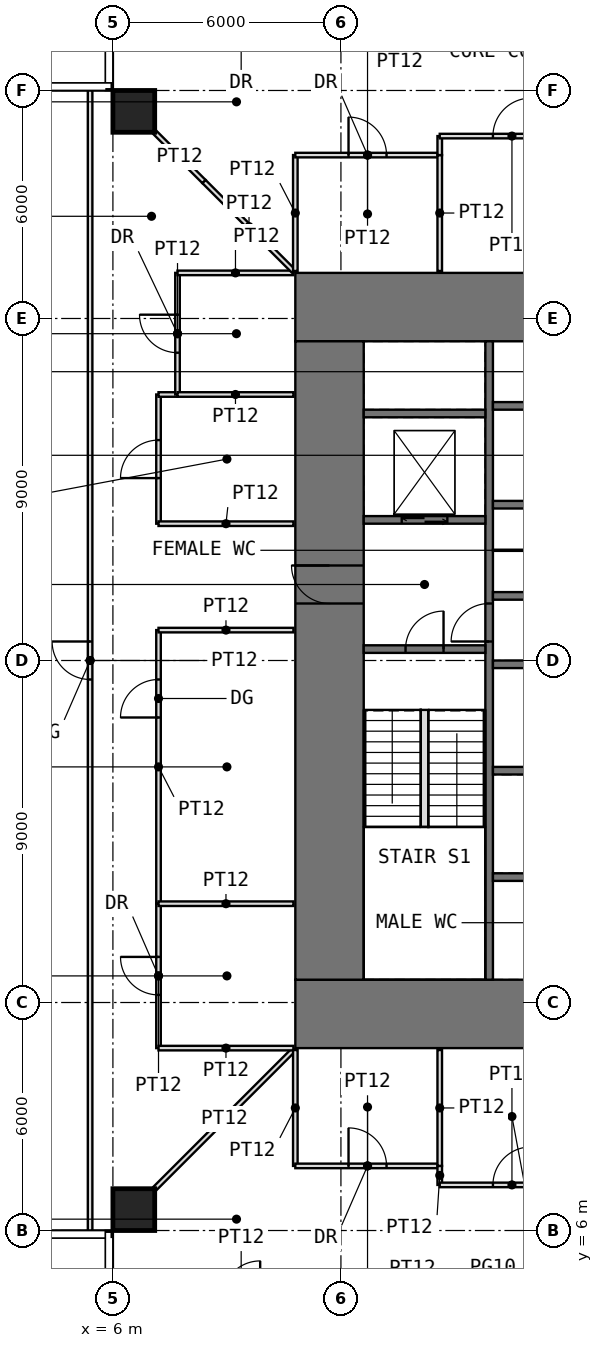
"""IFC4 building model, lengths in metres.
Left out: names, types, materials, properties, quantities, classifications, styles, units other than length and angle.
Written with IfcOpenShell. Run it as: python <this file> out.ifc"""

import sys

from ifc_helpers import new_model, si_unit, direction, frame, frame_2d, origin, origin_2d, place, context, subcontext, project, spatial, rectangle, extrude, element, fill, save


model = new_model("IFC4")
c1 = context("Model", 3, precision=1e-05, world=origin(), true_north=direction((0.0, 1.0)))
c2 = subcontext(c1, "Body", "Model", "MODEL_VIEW")
j1 = project(units=[si_unit("LENGTHUNIT", "METRE"), si_unit("PLANEANGLEUNIT", "RADIAN")], contexts=[c1])
p1 = place(None, origin())
s1 = spatial("IfcSite", under=j1, at=p1, CompositionType="ELEMENT")
p2 = place(p1, origin())
s2 = spatial("IfcBuilding", under=s1, at=p2, CompositionType="ELEMENT")
p3 = place(p2, frame((0.0, 0.0, 22.5)))
s3 = spatial("IfcBuildingStorey", under=s2, at=p3, CompositionType="ELEMENT", Elevation=22.5)
for number, where, z_axis, x_axis in (
    (1, (6.55, 6.55, 0.0), (0.0, 0.0, 1.0), (1.0, 0.0, 0.0)),
    (2, (6.55, 35.45, 0.0), (0.0, 0.0, 1.0), (1.0, 0.0, 0.0)),
):
    element("IfcColumn", number, at=place(p3, frame(where, z_axis=z_axis, x_axis=x_axis)), inside=s3, PredefinedType="COLUMN", context=c2, shape_type="SweptSolid", body=[
        extrude(rectangle(XDim=1.1, YDim=1.1, at=origin_2d()), origin(), (0.0, 0.0, 1.0), 4.0),
    ])
p4 = place(p3, frame((10.8, 11.7, -0.05), z_axis=(0.0, 0.0, 1.0), x_axis=(1.0, 0.0, 0.0)))
e3 = element("IfcWall", 3, at=p4, inside=s3, PredefinedType="SHEAR", context=c2, shape_type="SweptSolid", body=[
    extrude(rectangle(XDim=20.4, YDim=1.8, at=frame_2d((10.2, 0.0))), origin(), (0.0, 0.0, 1.0), 4.0),
])
p5 = place(p4, frame((9.2, 0.0, 0.05)))
e4 = element("IfcOpeningElement", 4, at=p5, cuts=e3, PredefinedType="OPENING", context=c2, shape_type="SweptSolid", body=[
    extrude(rectangle(XDim=2.0, YDim=2.2, at=frame_2d((1.0, 1.1))), frame((0.0, 0.91, 0.0), z_axis=(0.0, -1.0, 0.0), x_axis=(1.0, 0.0, 0.0)), (0.0, 0.0, 1.0), 1.82),
])
p6 = place(p3, frame((10.8, 30.3, -0.05), z_axis=(0.0, 0.0, 1.0), x_axis=(1.0, 0.0, 0.0)))
e5 = element("IfcWall", 5, at=p6, inside=s3, PredefinedType="SHEAR", context=c2, shape_type="SweptSolid", body=[
    extrude(rectangle(XDim=20.4, YDim=1.8, at=frame_2d((10.2, 0.0))), origin(), (0.0, 0.0, 1.0), 4.0),
])
p7 = place(p6, frame((9.2, 0.0, 0.05)))
e6 = element("IfcOpeningElement", 6, at=p7, cuts=e5, PredefinedType="OPENING", context=c2, shape_type="SweptSolid", body=[
    extrude(rectangle(XDim=2.0, YDim=2.2, at=frame_2d((1.0, 1.1))), frame((0.0, 0.91, 0.0), z_axis=(0.0, -1.0, 0.0), x_axis=(1.0, 0.0, 0.0)), (0.0, 0.0, 1.0), 1.82),
])
p8 = place(p3, frame((11.7, 12.6, -0.05), z_axis=(0.0, 0.0, 1.0), x_axis=(0.0, 1.0, 0.0)))
e7 = element("IfcWall", 7, at=p8, inside=s3, PredefinedType="SHEAR", context=c2, shape_type="SweptSolid", body=[
    extrude(rectangle(XDim=16.8, YDim=1.8, at=frame_2d((8.4, 0.0))), origin(), (0.0, 0.0, 1.0), 4.0),
])
p9 = place(p8, frame((9.9, 0.0, 0.05)))
e8 = element("IfcOpeningElement", 8, at=p9, cuts=e7, PredefinedType="OPENING", context=c2, shape_type="SweptSolid", body=[
    extrude(rectangle(XDim=1.0, YDim=2.2, at=frame_2d((0.5, 1.1))), frame((0.0, 0.91, 0.0), z_axis=(0.0, -1.0, 0.0), x_axis=(1.0, 0.0, 0.0)), (0.0, 0.0, 1.0), 1.82),
])
p10 = place(p3, frame((15.9, 12.6, -0.05), z_axis=(0.0, 0.0, 1.0), x_axis=(0.0, 1.0, 0.0)))
e9 = element("IfcWall", 9, at=p10, inside=s3, PredefinedType="SHEAR", context=c2, shape_type="SweptSolid", body=[
    extrude(rectangle(XDim=16.8, YDim=0.2, at=frame_2d((8.4, 0.0))), origin(), (0.0, 0.0, 1.0), 4.0),
])
p11 = place(p10, frame((8.9, 0.0, 0.05)))
e10 = element("IfcOpeningElement", 10, at=p11, cuts=e9, PredefinedType="OPENING", context=c2, shape_type="SweptSolid", body=[
    extrude(rectangle(XDim=1.0, YDim=2.2, at=frame_2d((0.5, 1.1))), frame((0.0, 0.11, 0.0), z_axis=(0.0, -1.0, 0.0), x_axis=(1.0, 0.0, 0.0)), (0.0, 0.0, 1.0), 0.22),
])
p12 = place(p3, frame((12.6, 21.3, -0.05), z_axis=(0.0, 0.0, 1.0), x_axis=(1.0, 0.0, 0.0)))
e11 = element("IfcWall", 11, at=p12, inside=s3, PredefinedType="SHEAR", context=c2, shape_type="SweptSolid", body=[
    extrude(rectangle(XDim=3.2, YDim=0.2, at=frame_2d((1.6, 0.0))), origin(), (0.0, 0.0, 1.0), 4.0),
])
p13 = place(p12, frame((1.1, 0.0, 0.05)))
e12 = element("IfcOpeningElement", 12, at=p13, cuts=e11, PredefinedType="OPENING", context=c2, shape_type="SweptSolid", body=[
    extrude(rectangle(XDim=1.0, YDim=2.2, at=frame_2d((0.5, 1.1))), frame((0.0, 0.11, 0.0), z_axis=(0.0, -1.0, 0.0), x_axis=(1.0, 0.0, 0.0)), (0.0, 0.0, 1.0), 0.22),
])
p14 = place(p3, frame((12.6, 24.7, -0.05), z_axis=(0.0, 0.0, 1.0), x_axis=(1.0, 0.0, 0.0)))
e13 = element("IfcWall", 13, at=p14, inside=s3, PredefinedType="SHEAR", context=c2, shape_type="SweptSolid", body=[
    extrude(rectangle(XDim=3.2, YDim=0.2, at=frame_2d((1.6, 0.0))), origin(), (0.0, 0.0, 1.0), 4.0),
])
p15 = place(p14, frame((1.0, 0.0, 0.05)))
e14 = element("IfcOpeningElement", 14, at=p15, cuts=e13, PredefinedType="OPENING", context=c2, shape_type="SweptSolid", body=[
    extrude(rectangle(XDim=1.2, YDim=2.2, at=frame_2d((0.6, 1.1))), frame((0.0, 0.11, 0.0), z_axis=(0.0, -1.0, 0.0), x_axis=(1.0, 0.0, 0.0)), (0.0, 0.0, 1.0), 0.22),
])
for number, where, z_axis, x_axis in (
    (15, (12.6, 27.5, -0.05), (0.0, 0.0, 1.0), (1.0, 0.0, 0.0)),
    (16, (16.0, 15.3, -0.05), (0.0, 0.0, 1.0), (1.0, 0.0, 0.0)),
    (17, (16.0, 18.1, -0.05), (0.0, 0.0, 1.0), (1.0, 0.0, 0.0)),
    (18, (16.0, 20.9, -0.05), (0.0, 0.0, 1.0), (1.0, 0.0, 0.0)),
    (19, (16.0, 22.7, -0.05), (0.0, 0.0, 1.0), (1.0, 0.0, 0.0)),
    (20, (16.0, 25.1, -0.05), (0.0, 0.0, 1.0), (1.0, 0.0, 0.0)),
    (21, (16.0, 27.7, -0.05), (0.0, 0.0, 1.0), (1.0, 0.0, 0.0)),
):
    element("IfcWall", number, at=place(p3, frame(where, z_axis=z_axis, x_axis=x_axis)), inside=s3, PredefinedType="SHEAR", context=c2, shape_type="SweptSolid", body=[
        extrude(rectangle(XDim=3.2, YDim=0.2, at=frame_2d((1.6, 0.0))), origin(), (0.0, 0.0, 1.0), 4.0),
    ])
p16 = place(p3, frame((16.0, 23.9, 0.0), z_axis=(0.0, 0.0, 1.0), x_axis=(1.0, 0.0, 0.0)))
e22 = element("IfcWall", 22, at=p16, inside=s3, PredefinedType="PARTITIONING", context=c2, shape_type="SweptSolid", body=[
    extrude(rectangle(XDim=1.4, YDim=0.03, at=frame_2d((0.7, 0.0))), origin(), (0.0, 0.0, 1.0), 3.75),
])
p17 = place(p3, frame((5.4, 6.0, 0.0), z_axis=(0.0, 0.0, 1.0), x_axis=(0.0, 1.0, 0.0)))
e23 = element("IfcWall", 23, at=p17, inside=s3, PredefinedType="PARTITIONING", context=c2, shape_type="SweptSolid", body=[
    extrude(rectangle(XDim=30.0, YDim=0.12, at=frame_2d((15.0, 0.0))), origin(), (0.0, 0.0, 1.0), 3.75),
])
p18 = place(p17, frame((14.5, 0.0, 0.0)))
e24 = element("IfcOpeningElement", 24, at=p18, cuts=e23, PredefinedType="OPENING", context=c2, shape_type="SweptSolid", body=[
    extrude(rectangle(XDim=1.0, YDim=2.4, at=frame_2d((0.5, 1.2))), frame((0.0, 0.07, 0.0), z_axis=(0.0, -1.0, 0.0), x_axis=(1.0, 0.0, 0.0)), (0.0, 0.0, 1.0), 0.14),
])
p19 = place(p3, frame((7.11, 7.11, 0.0), z_axis=(0.0, 0.0, 1.0), x_axis=(0.707106781187, 0.707106781187, 0.0)))
e25 = element("IfcWall", 25, at=p19, inside=s3, PredefinedType="PARTITIONING", context=c2, shape_type="SweptSolid", body=[
    extrude(rectangle(XDim=5.168, YDim=0.12, at=frame_2d((2.584, 0.0))), origin(), (0.0, 0.0, 1.0), 3.75),
])
p20 = place(p3, frame((7.11, 34.89, 0.0), z_axis=(0.0, 0.0, 1.0), x_axis=(0.707106781187, -0.707106781187, 0.0)))
e26 = element("IfcWall", 26, at=p20, inside=s3, PredefinedType="PARTITIONING", context=c2, shape_type="SweptSolid", body=[
    extrude(rectangle(XDim=1.822, YDim=0.12, at=frame_2d((0.911, 0.0))), origin(), (0.0, 0.0, 1.0), 3.75),
])
p21 = place(p3, frame((7.2, 10.8, 0.0), z_axis=(0.0, 0.0, 1.0), x_axis=(0.0, 1.0, 0.0)))
e27 = element("IfcWall", 27, at=p21, inside=s3, PredefinedType="PARTITIONING", context=c2, shape_type="SweptSolid", body=[
    extrude(rectangle(XDim=3.8, YDim=0.12, at=frame_2d((1.9, 0.0))), origin(), (0.0, 0.0, 1.0), 3.75),
])
p22 = place(p21, frame((1.4, 0.0, 0.0)))
e28 = element("IfcOpeningElement", 28, at=p22, cuts=e27, PredefinedType="OPENING", context=c2, shape_type="SweptSolid", body=[
    extrude(rectangle(XDim=1.0, YDim=2.2, at=frame_2d((0.5, 1.1))), frame((0.0, 0.07, 0.0), z_axis=(0.0, -1.0, 0.0), x_axis=(1.0, 0.0, 0.0)), (0.0, 0.0, 1.0), 0.14),
])
p23 = place(p3, frame((7.2, 10.8, 0.0), z_axis=(0.0, 0.0, 1.0), x_axis=(1.0, 0.0, 0.0)))
e29 = element("IfcWall", 29, at=p23, inside=s3, PredefinedType="PARTITIONING", context=c2, shape_type="SweptSolid", body=[
    extrude(rectangle(XDim=3.55, YDim=0.12, at=frame_2d((1.775, 0.0))), origin(), (0.0, 0.0, 1.0), 3.75),
])
p24 = place(p3, frame((7.2, 14.6, 0.0), z_axis=(0.0, 0.0, 1.0), x_axis=(0.0, 1.0, 0.0)))
e30 = element("IfcWall", 30, at=p24, inside=s3, PredefinedType="PARTITIONING", context=c2, shape_type="SweptSolid", body=[
    extrude(rectangle(XDim=7.2, YDim=0.12, at=frame_2d((3.6, 0.0))), origin(), (0.0, 0.0, 1.0), 3.75),
])
p25 = place(p24, frame((4.9, 0.0, 0.0)))
e31 = element("IfcOpeningElement", 31, at=p25, cuts=e30, PredefinedType="OPENING", context=c2, shape_type="SweptSolid", body=[
    extrude(rectangle(XDim=1.0, YDim=2.4, at=frame_2d((0.5, 1.2))), frame((0.0, 0.07, 0.0), z_axis=(0.0, -1.0, 0.0), x_axis=(1.0, 0.0, 0.0)), (0.0, 0.0, 1.0), 0.14),
])
for number, where, z_axis, x_axis in (
    (32, (7.2, 14.6, 0.0), (0.0, 0.0, 1.0), (1.0, 0.0, 0.0)),
    (33, (7.2, 21.8, 0.0), (0.0, 0.0, 1.0), (1.0, 0.0, 0.0)),
):
    element("IfcWall", number, at=place(p3, frame(where, z_axis=z_axis, x_axis=x_axis)), inside=s3, PredefinedType="PARTITIONING", context=c2, shape_type="SweptSolid", body=[
        extrude(rectangle(XDim=3.55, YDim=0.12, at=frame_2d((1.775, 0.0))), origin(), (0.0, 0.0, 1.0), 3.75),
    ])
p26 = place(p3, frame((7.2, 24.6, 0.0), z_axis=(0.0, 0.0, 1.0), x_axis=(0.0, 1.0, 0.0)))
e34 = element("IfcWall", 34, at=p26, inside=s3, PredefinedType="PARTITIONING", context=c2, shape_type="SweptSolid", body=[
    extrude(rectangle(XDim=3.4, YDim=0.12, at=frame_2d((1.7, 0.0))), origin(), (0.0, 0.0, 1.0), 3.75),
])
p27 = place(p26, frame((1.2, 0.0, 0.0)))
e35 = element("IfcOpeningElement", 35, at=p27, cuts=e34, PredefinedType="OPENING", context=c2, shape_type="SweptSolid", body=[
    extrude(rectangle(XDim=1.0, YDim=2.4, at=frame_2d((0.5, 1.2))), frame((0.0, 0.07, 0.0), z_axis=(0.0, -1.0, 0.0), x_axis=(1.0, 0.0, 0.0)), (0.0, 0.0, 1.0), 0.14),
])
p28 = place(p3, frame((7.2, 24.6, 0.0), z_axis=(0.0, 0.0, 1.0), x_axis=(1.0, 0.0, 0.0)))
e36 = element("IfcWall", 36, at=p28, inside=s3, PredefinedType="PARTITIONING", context=c2, shape_type="SweptSolid", body=[
    extrude(rectangle(XDim=3.55, YDim=0.12, at=frame_2d((1.775, 0.0))), origin(), (0.0, 0.0, 1.0), 3.75),
])
p29 = place(p3, frame((7.2, 28.0, 0.0), z_axis=(0.0, 0.0, 1.0), x_axis=(1.0, 0.0, 0.0)))
e37 = element("IfcWall", 37, at=p29, inside=s3, PredefinedType="PARTITIONING", context=c2, shape_type="SweptSolid", body=[
    extrude(rectangle(XDim=0.5, YDim=0.12, at=frame_2d((0.25, 0.0))), origin(), (0.0, 0.0, 1.0), 3.75),
])
p30 = place(p3, frame((7.7, 28.0, 0.0), z_axis=(0.0, 0.0, 1.0), x_axis=(0.0, 1.0, 0.0)))
e38 = element("IfcWall", 38, at=p30, inside=s3, PredefinedType="PARTITIONING", context=c2, shape_type="SweptSolid", body=[
    extrude(rectangle(XDim=3.2, YDim=0.12, at=frame_2d((1.6, 0.0))), origin(), (0.0, 0.0, 1.0), 3.75),
])
p31 = place(p30, frame((1.1, 0.0, 0.0)))
e39 = element("IfcOpeningElement", 39, at=p31, cuts=e38, PredefinedType="OPENING", context=c2, shape_type="SweptSolid", body=[
    extrude(rectangle(XDim=1.0, YDim=2.2, at=frame_2d((0.5, 1.1))), frame((0.0, 0.07, 0.0), z_axis=(0.0, -1.0, 0.0), x_axis=(1.0, 0.0, 0.0)), (0.0, 0.0, 1.0), 0.14),
])
for number, where, z_axis, x_axis in (
    (40, (7.7, 28.0, 0.0), (0.0, 0.0, 1.0), (1.0, 0.0, 0.0)),
    (41, (7.7, 31.2, 0.0), (0.0, 0.0, 1.0), (1.0, 0.0, 0.0)),
):
    element("IfcWall", number, at=place(p3, frame(where, z_axis=z_axis, x_axis=x_axis)), inside=s3, PredefinedType="PARTITIONING", context=c2, shape_type="SweptSolid", body=[
        extrude(rectangle(XDim=3.05, YDim=0.12, at=frame_2d((1.525, 0.0))), origin(), (0.0, 0.0, 1.0), 3.75),
    ])
p32 = place(p3, frame((8.398, 33.602, 0.0), z_axis=(0.0, 0.0, 1.0), x_axis=(0.707106781187, -0.707106781187, 0.0)))
e42 = element("IfcWall", 42, at=p32, inside=s3, PredefinedType="PARTITIONING", context=c2, shape_type="SweptSolid", body=[
    extrude(rectangle(XDim=3.346, YDim=0.12, at=frame_2d((1.673, 0.0))), origin(), (0.0, 0.0, 1.0), 3.75),
])
p33 = place(p3, frame((10.8, 7.7, 0.0), z_axis=(0.0, 0.0, 1.0), x_axis=(0.0, 1.0, 0.0)))
e43 = element("IfcWall", 43, at=p33, inside=s3, PredefinedType="PARTITIONING", context=c2, shape_type="SweptSolid", body=[
    extrude(rectangle(XDim=3.05, YDim=0.12, at=frame_2d((1.525, 0.0))), origin(), (0.0, 0.0, 1.0), 3.75),
])
p34 = place(p3, frame((10.8, 7.7, 0.0), z_axis=(0.0, 0.0, 1.0), x_axis=(1.0, 0.0, 0.0)))
e44 = element("IfcWall", 44, at=p34, inside=s3, PredefinedType="PARTITIONING", context=c2, shape_type="SweptSolid", body=[
    extrude(rectangle(XDim=3.8, YDim=0.12, at=frame_2d((1.9, 0.0))), origin(), (0.0, 0.0, 1.0), 3.75),
])
p35 = place(p34, frame((1.4, 0.0, 0.0)))
e45 = element("IfcOpeningElement", 45, at=p35, cuts=e44, PredefinedType="OPENING", context=c2, shape_type="SweptSolid", body=[
    extrude(rectangle(XDim=1.0, YDim=2.2, at=frame_2d((0.5, 1.1))), frame((0.0, 0.07, 0.0), z_axis=(0.0, -1.0, 0.0), x_axis=(1.0, 0.0, 0.0)), (0.0, 0.0, 1.0), 0.14),
])
p36 = place(p3, frame((10.8, 31.25, 0.0), z_axis=(0.0, 0.0, 1.0), x_axis=(0.0, 1.0, 0.0)))
e46 = element("IfcWall", 46, at=p36, inside=s3, PredefinedType="PARTITIONING", context=c2, shape_type="SweptSolid", body=[
    extrude(rectangle(XDim=3.05, YDim=0.12, at=frame_2d((1.525, 0.0))), origin(), (0.0, 0.0, 1.0), 3.75),
])
p37 = place(p3, frame((10.8, 34.3, 0.0), z_axis=(0.0, 0.0, 1.0), x_axis=(1.0, 0.0, 0.0)))
e47 = element("IfcWall", 47, at=p37, inside=s3, PredefinedType="PARTITIONING", context=c2, shape_type="SweptSolid", body=[
    extrude(rectangle(XDim=3.8, YDim=0.12, at=frame_2d((1.9, 0.0))), origin(), (0.0, 0.0, 1.0), 3.75),
])
p38 = place(p37, frame((1.4, 0.0, 0.0)))
e48 = element("IfcOpeningElement", 48, at=p38, cuts=e47, PredefinedType="OPENING", context=c2, shape_type="SweptSolid", body=[
    extrude(rectangle(XDim=1.0, YDim=2.2, at=frame_2d((0.5, 1.1))), frame((0.0, 0.07, 0.0), z_axis=(0.0, -1.0, 0.0), x_axis=(1.0, 0.0, 0.0)), (0.0, 0.0, 1.0), 0.14),
])
p39 = place(p3, frame((14.6, 7.2, 0.0), z_axis=(0.0, 0.0, 1.0), x_axis=(0.0, 1.0, 0.0)))
e49 = element("IfcWall", 49, at=p39, inside=s3, PredefinedType="PARTITIONING", context=c2, shape_type="SweptSolid", body=[
    extrude(rectangle(XDim=0.5, YDim=0.12, at=frame_2d((0.25, 0.0))), origin(), (0.0, 0.0, 1.0), 3.75),
])
p40 = place(p3, frame((14.6, 7.2, 0.0), z_axis=(0.0, 0.0, 1.0), x_axis=(1.0, 0.0, 0.0)))
e50 = element("IfcWall", 50, at=p40, inside=s3, PredefinedType="PARTITIONING", context=c2, shape_type="SweptSolid", body=[
    extrude(rectangle(XDim=3.8, YDim=0.12, at=frame_2d((1.9, 0.0))), origin(), (0.0, 0.0, 1.0), 3.75),
])
p41 = place(p40, frame((1.4, 0.0, 0.0)))
e51 = element("IfcOpeningElement", 51, at=p41, cuts=e50, PredefinedType="OPENING", context=c2, shape_type="SweptSolid", body=[
    extrude(rectangle(XDim=1.0, YDim=2.4, at=frame_2d((0.5, 1.2))), frame((0.0, 0.07, 0.0), z_axis=(0.0, -1.0, 0.0), x_axis=(1.0, 0.0, 0.0)), (0.0, 0.0, 1.0), 0.14),
])
for number, where, z_axis, x_axis in (
    (52, (14.6, 7.7, 0.0), (0.0, 0.0, 1.0), (0.0, 1.0, 0.0)),
    (53, (14.6, 31.25, 0.0), (0.0, 0.0, 1.0), (0.0, 1.0, 0.0)),
):
    element("IfcWall", number, at=place(p3, frame(where, z_axis=z_axis, x_axis=x_axis)), inside=s3, PredefinedType="PARTITIONING", context=c2, shape_type="SweptSolid", body=[
        extrude(rectangle(XDim=3.05, YDim=0.12, at=frame_2d((1.525, 0.0))), origin(), (0.0, 0.0, 1.0), 3.75),
    ])
p42 = place(p3, frame((14.6, 34.3, 0.0), z_axis=(0.0, 0.0, 1.0), x_axis=(0.0, 1.0, 0.0)))
e54 = element("IfcWall", 54, at=p42, inside=s3, PredefinedType="PARTITIONING", context=c2, shape_type="SweptSolid", body=[
    extrude(rectangle(XDim=0.5, YDim=0.12, at=frame_2d((0.25, 0.0))), origin(), (0.0, 0.0, 1.0), 3.75),
])
p43 = place(p3, frame((14.6, 34.8, 0.0), z_axis=(0.0, 0.0, 1.0), x_axis=(1.0, 0.0, 0.0)))
e55 = element("IfcWall", 55, at=p43, inside=s3, PredefinedType="PARTITIONING", context=c2, shape_type="SweptSolid", body=[
    extrude(rectangle(XDim=3.8, YDim=0.12, at=frame_2d((1.9, 0.0))), origin(), (0.0, 0.0, 1.0), 3.75),
])
p44 = place(p43, frame((1.4, 0.0, 0.0)))
e56 = element("IfcOpeningElement", 56, at=p44, cuts=e55, PredefinedType="OPENING", context=c2, shape_type="SweptSolid", body=[
    extrude(rectangle(XDim=1.0, YDim=2.4, at=frame_2d((0.5, 1.2))), frame((0.0, 0.07, 0.0), z_axis=(0.0, -1.0, 0.0), x_axis=(1.0, 0.0, 0.0)), (0.0, 0.0, 1.0), 0.14),
])
p45 = place(p3, frame((14.2, 16.62, 0.0), z_axis=(0.0, 0.0, 1.0), x_axis=(0.0, 1.0, 0.0)))
e57 = element("IfcWall", 57, at=p45, inside=s3, PredefinedType="PARTITIONING", context=c2, shape_type="SweptSolid", body=[
    extrude(rectangle(XDim=3.08, YDim=0.2, at=frame_2d((1.54, 0.0))), origin(), (0.0, 0.0, 1.0), 4.0),
])
p46 = place(p9, origin())
e58 = element("IfcDoor", 58, at=p46, inside=s3, OperationType="SINGLE_SWING_RIGHT", PredefinedType="DOOR", context=c2, shape_type="SweptSolid", body=[
    extrude(rectangle(XDim=1.0, YDim=2.2, at=frame_2d((0.5, 1.1))), frame((0.0, 0.025, 0.0), z_axis=(0.0, -1.0, 0.0), x_axis=(1.0, 0.0, 0.0)), (0.0, 0.0, 1.0), 0.05),
])
fill(e8, e58)
p47 = place(p13, origin())
e59 = element("IfcDoor", 59, at=p47, inside=s3, OperationType="SINGLE_SWING_RIGHT", PredefinedType="DOOR", context=c2, shape_type="SweptSolid", body=[
    extrude(rectangle(XDim=1.0, YDim=2.2, at=frame_2d((0.5, 1.1))), frame((0.0, 0.025, 0.0), z_axis=(0.0, -1.0, 0.0), x_axis=(1.0, 0.0, 0.0)), (0.0, 0.0, 1.0), 0.05),
])
fill(e12, e59)
p48 = place(p11, origin())
e60 = element("IfcDoor", 60, at=p48, inside=s3, OperationType="SINGLE_SWING_LEFT", PredefinedType="DOOR", context=c2, shape_type="SweptSolid", body=[
    extrude(rectangle(XDim=1.0, YDim=2.2, at=frame_2d((0.5, 1.1))), frame((0.0, 0.025, 0.0), z_axis=(0.0, -1.0, 0.0), x_axis=(1.0, 0.0, 0.0)), (0.0, 0.0, 1.0), 0.05),
])
fill(e10, e60)
p49 = place(p35, origin())
e61 = element("IfcDoor", 61, at=p49, inside=s3, OperationType="SINGLE_SWING_LEFT", PredefinedType="DOOR", context=c2, shape_type="SweptSolid", body=[
    extrude(rectangle(XDim=1.0, YDim=2.2, at=frame_2d((0.5, 1.1))), frame((0.0, 0.025, 0.0), z_axis=(0.0, -1.0, 0.0), x_axis=(1.0, 0.0, 0.0)), (0.0, 0.0, 1.0), 0.05),
])
fill(e45, e61)
p50 = place(p41, origin())
e62 = element("IfcDoor", 62, at=p50, inside=s3, OperationType="SINGLE_SWING_RIGHT", PredefinedType="DOOR", context=c2, shape_type="SweptSolid", body=[
    extrude(rectangle(XDim=1.0, YDim=2.4, at=frame_2d((0.5, 1.2))), frame((0.0, 0.025, 0.0), z_axis=(0.0, -1.0, 0.0), x_axis=(1.0, 0.0, 0.0)), (0.0, 0.0, 1.0), 0.05),
])
fill(e51, e62)
p51 = place(p38, origin())
e63 = element("IfcDoor", 63, at=p51, inside=s3, OperationType="SINGLE_SWING_LEFT", PredefinedType="DOOR", context=c2, shape_type="SweptSolid", body=[
    extrude(rectangle(XDim=1.0, YDim=2.2, at=frame_2d((0.5, 1.1))), frame((0.0, 0.025, 0.0), z_axis=(0.0, -1.0, 0.0), x_axis=(1.0, 0.0, 0.0)), (0.0, 0.0, 1.0), 0.05),
])
fill(e48, e63)
p52 = place(p44, origin())
e64 = element("IfcDoor", 64, at=p52, inside=s3, OperationType="SINGLE_SWING_RIGHT", PredefinedType="DOOR", context=c2, shape_type="SweptSolid", body=[
    extrude(rectangle(XDim=1.0, YDim=2.4, at=frame_2d((0.5, 1.2))), frame((0.0, 0.025, 0.0), z_axis=(0.0, -1.0, 0.0), x_axis=(1.0, 0.0, 0.0)), (0.0, 0.0, 1.0), 0.05),
])
fill(e56, e64)
p53 = place(p22, origin())
e65 = element("IfcDoor", 65, at=p53, inside=s3, OperationType="SINGLE_SWING_RIGHT", PredefinedType="DOOR", context=c2, shape_type="SweptSolid", body=[
    extrude(rectangle(XDim=1.0, YDim=2.2, at=frame_2d((0.5, 1.1))), frame((0.0, 0.025, 0.0), z_axis=(0.0, -1.0, 0.0), x_axis=(1.0, 0.0, 0.0)), (0.0, 0.0, 1.0), 0.05),
])
fill(e28, e65)
p54 = place(p27, origin())
e66 = element("IfcDoor", 66, at=p54, inside=s3, OperationType="SINGLE_SWING_LEFT", PredefinedType="DOOR", context=c2, shape_type="SweptSolid", body=[
    extrude(rectangle(XDim=1.0, YDim=2.4, at=frame_2d((0.5, 1.2))), frame((0.0, 0.025, 0.0), z_axis=(0.0, -1.0, 0.0), x_axis=(1.0, 0.0, 0.0)), (0.0, 0.0, 1.0), 0.05),
])
fill(e35, e66)
p55 = place(p31, origin())
e67 = element("IfcDoor", 67, at=p55, inside=s3, OperationType="SINGLE_SWING_RIGHT", PredefinedType="DOOR", context=c2, shape_type="SweptSolid", body=[
    extrude(rectangle(XDim=1.0, YDim=2.2, at=frame_2d((0.5, 1.1))), frame((0.0, 0.025, 0.0), z_axis=(0.0, -1.0, 0.0), x_axis=(1.0, 0.0, 0.0)), (0.0, 0.0, 1.0), 0.05),
])
fill(e39, e67)
p56 = place(p18, origin())
e68 = element("IfcDoor", 68, at=p56, inside=s3, OperationType="SINGLE_SWING_RIGHT", PredefinedType="DOOR", context=c2, shape_type="SweptSolid", body=[
    extrude(rectangle(XDim=1.0, YDim=2.4, at=frame_2d((0.5, 1.2))), frame((0.0, 0.025, 0.0), z_axis=(0.0, -1.0, 0.0), x_axis=(1.0, 0.0, 0.0)), (0.0, 0.0, 1.0), 0.05),
])
fill(e24, e68)
p57 = place(p25, origin())
e69 = element("IfcDoor", 69, at=p57, inside=s3, OperationType="SINGLE_SWING_LEFT", PredefinedType="DOOR", context=c2, shape_type="SweptSolid", body=[
    extrude(rectangle(XDim=1.0, YDim=2.4, at=frame_2d((0.5, 1.2))), frame((0.0, 0.025, 0.0), z_axis=(0.0, -1.0, 0.0), x_axis=(1.0, 0.0, 0.0)), (0.0, 0.0, 1.0), 0.05),
])
fill(e31, e69)
p58 = place(p15, origin())
e70 = element("IfcDoor", 70, at=p58, inside=s3, OperationType="DOUBLE_DOOR_SLIDING", PredefinedType="DOOR", context=c2, shape_type="SweptSolid", body=[
    extrude(rectangle(XDim=1.2, YDim=2.2, at=frame_2d((0.6, 1.1))), frame((0.0, 0.025, 0.0), z_axis=(0.0, -1.0, 0.0), x_axis=(1.0, 0.0, 0.0)), (0.0, 0.0, 1.0), 0.05),
])
fill(e14, e70)
save(model, sys.argv[1])
